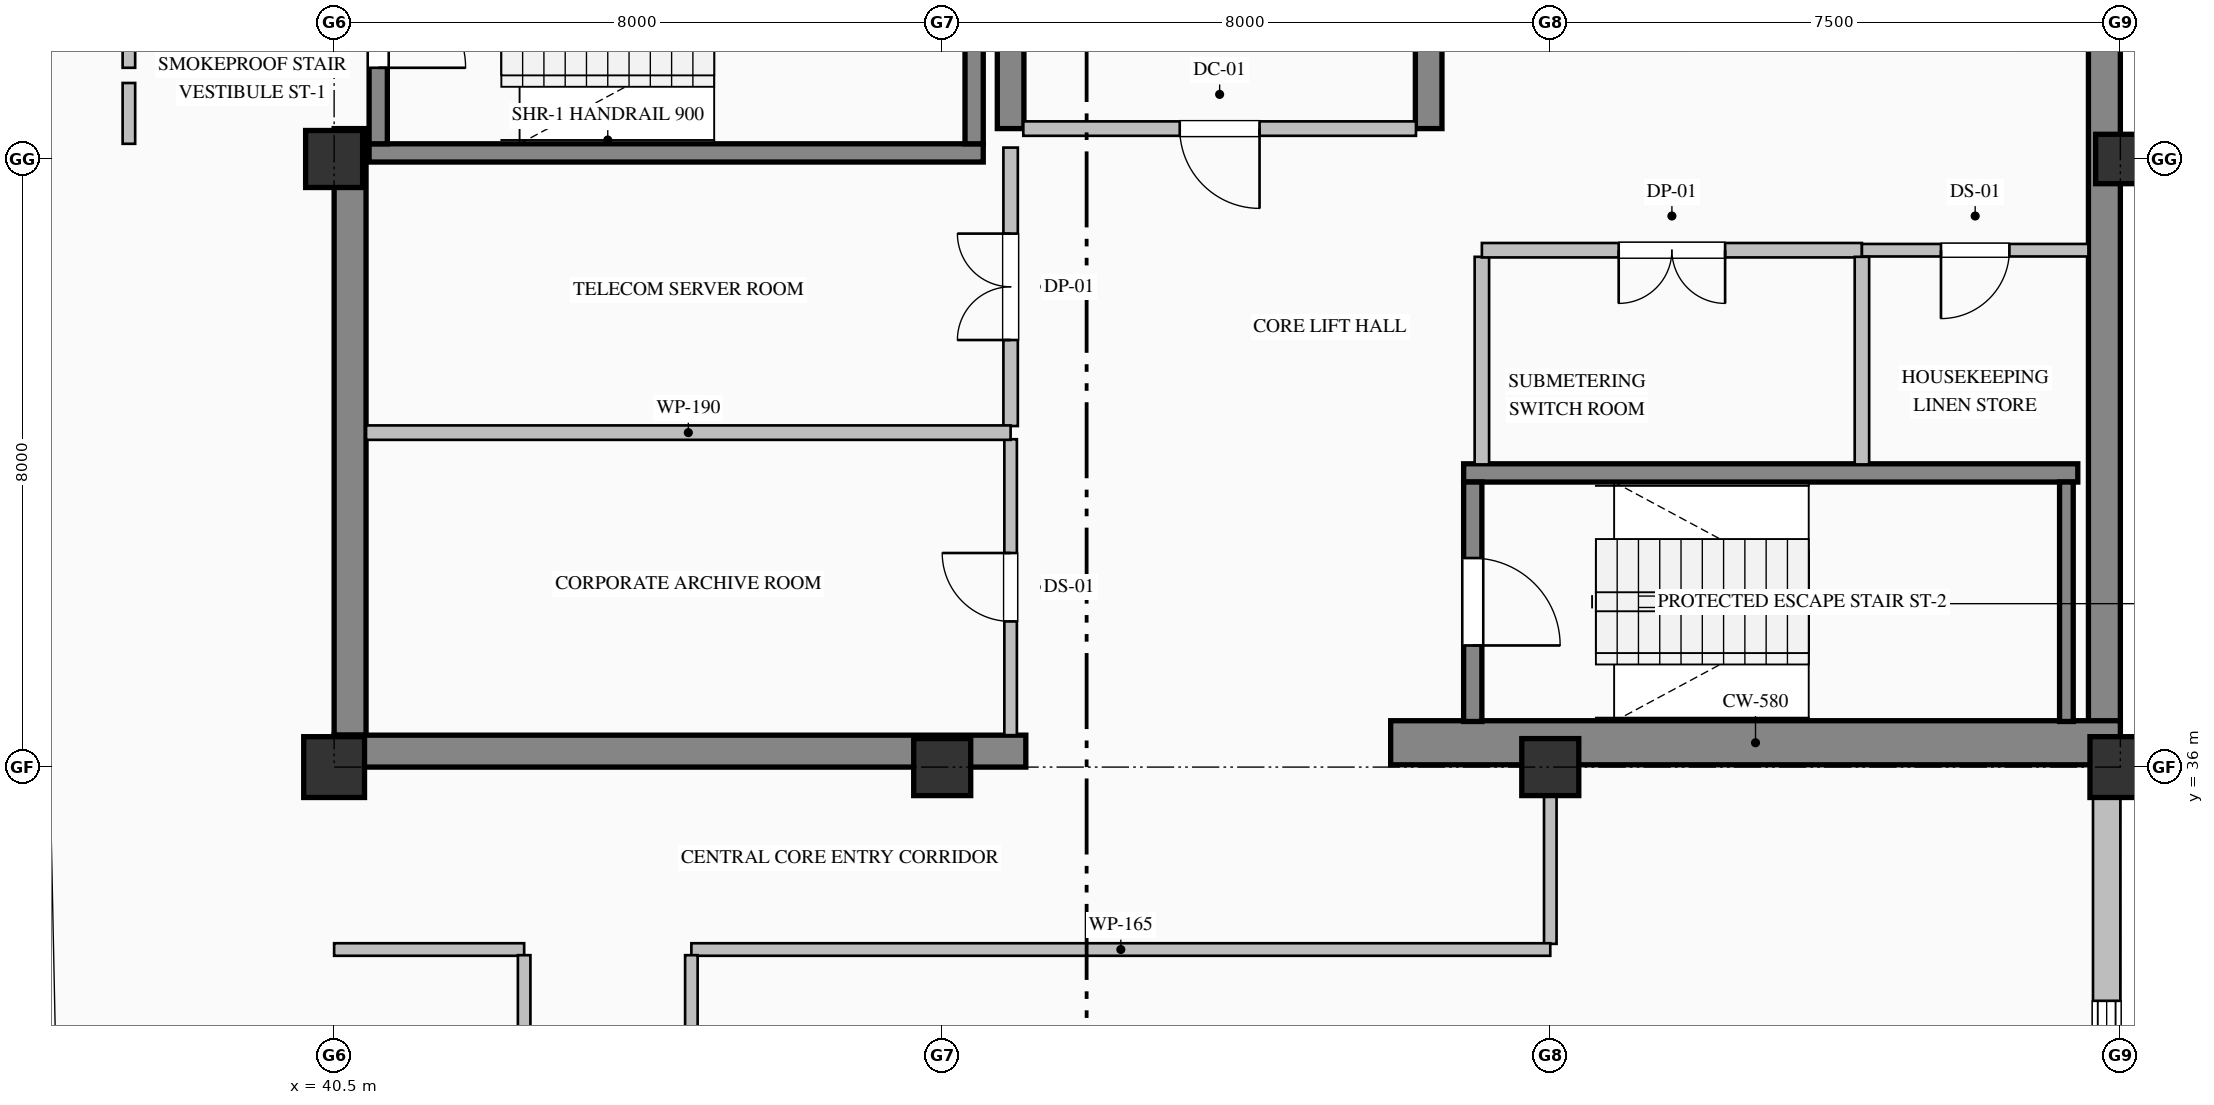
"""IFC4 building model, lengths in metres.
Left out: names, types, materials, properties, quantities, classifications, styles, units other than length and angle.
Written with IfcOpenShell. Run it as: python <this file> out.ifc"""

import sys

from ifc_helpers import new_model, si_unit, direction, frame, frame_2d, origin, origin_2d, place, context, subcontext, project, spatial, rectangle, hollow_rectangle, extrude, element, fill, save


model = new_model("IFC4")
c1 = context("Model", 3, precision=1e-05, world=origin(), true_north=direction((0.0, 1.0)))
c2 = subcontext(c1, "Body", "Model", "MODEL_VIEW")
j1 = project(units=[si_unit("LENGTHUNIT", "METRE"), si_unit("PLANEANGLEUNIT", "RADIAN")], contexts=[c1])
p1 = place(None, origin())
s1 = spatial("IfcSite", under=j1, at=p1, CompositionType="ELEMENT")
p2 = place(p1, origin())
s2 = spatial("IfcBuilding", under=s1, at=p2, CompositionType="ELEMENT")
p3 = place(p2, frame((0.0, 0.0, 311.2)))
s3 = spatial("IfcBuildingStorey", under=s2, at=p3, CompositionType="ELEMENT", Elevation=311.2)
p4 = place(p3, frame((63.79, 36.32, 0.0), z_axis=(0.0, 0.0, 1.0), x_axis=(0.0, 1.0, 0.0)))
e1 = element("IfcWall", 1, at=p4, inside=s3, PredefinedType="SHEAR", context=c2, shape_type="SweptSolid", body=[
    extrude(rectangle(XDim=15.26, YDim=0.42, at=frame_2d((7.63, 0.0))), origin(), (0.0, 0.0, 1.0), 3.785),
])
p5 = place(p3, frame((40.71, 36.42, 0.0), z_axis=(0.0, 0.0, 1.0), x_axis=(0.0, 1.0, 0.0)))
e2 = element("IfcWall", 2, at=p5, inside=s3, PredefinedType="SHEAR", context=c2, shape_type="SweptSolid", body=[
    extrude(rectangle(XDim=7.98, YDim=0.42, at=frame_2d((3.99, 0.0))), origin(), (0.0, 0.0, 1.0), 3.785),
])
p6 = place(p3, frame((40.5, 36.21, 0.0), z_axis=(0.0, 0.0, 1.0), x_axis=(1.0, 0.0, 0.0)))
e3 = element("IfcWall", 3, at=p6, inside=s3, PredefinedType="SHEAR", context=c2, shape_type="SweptSolid", body=[
    extrude(rectangle(XDim=9.1, YDim=0.42, at=frame_2d((4.55, 0.0))), origin(), (0.0, 0.0, 1.0), 3.785),
])
p7 = place(p3, frame((54.4, 36.32, 0.0), z_axis=(0.0, 0.0, 1.0), x_axis=(1.0, 0.0, 0.0)))
e4 = element("IfcWall", 4, at=p7, inside=s3, PredefinedType="SHEAR", context=c2, shape_type="SweptSolid", body=[
    extrude(rectangle(XDim=9.6, YDim=0.58, at=frame_2d((4.8, 0.0))), origin(), (0.0, 0.0, 1.0), 4.0),
])
p8 = place(p3, frame((49.4, 44.4, 0.0), z_axis=(0.0, 0.0, 1.0), x_axis=(0.0, 1.0, 0.0)))
e5 = element("IfcWall", 5, at=p8, inside=s3, PredefinedType="SHEAR", context=c2, shape_type="SweptSolid", body=[
    extrude(rectangle(XDim=3.0, YDim=0.35, at=frame_2d((1.5, 0.0))), origin(), (0.0, 0.0, 1.0), 3.785),
])
p9 = place(p3, frame((54.9, 44.4, 0.0), z_axis=(0.0, 0.0, 1.0), x_axis=(0.0, 1.0, 0.0)))
e6 = element("IfcWall", 6, at=p9, inside=s3, PredefinedType="SHEAR", context=c2, shape_type="SweptSolid", body=[
    extrude(rectangle(XDim=7.18, YDim=0.35, at=frame_2d((3.59, 0.0))), origin(), (0.0, 0.0, 1.0), 3.785),
])
p10 = place(p3, frame((40.5, 36.0, 0.0), z_axis=(0.0, 0.0, 1.0), x_axis=(1.0, 0.0, 0.0)))
e7 = element("IfcColumn", 7, at=p10, inside=s3, PredefinedType="COLUMN", context=c2, shape_type="SweptSolid", body=[
    extrude(hollow_rectangle(XDim=0.8, YDim=0.8, WallThickness=0.032, at=origin_2d()), origin(), (0.0, 0.0, 1.0), 4.0),
])
for number, where, z_axis, x_axis in (
    (8, (40.5, 44.0, 0.0), (0.0, 0.0, 1.0), (1.0, 0.0, 0.0)),
    (9, (48.5, 36.0, 0.0), (0.0, 0.0, 1.0), (1.0, 0.0, 0.0)),
    (10, (56.5, 36.0, 0.0), (0.0, 0.0, 1.0), (1.0, 0.0, 0.0)),
):
    element("IfcColumn", number, at=place(p3, frame(where, z_axis=z_axis, x_axis=x_axis)), inside=s3, PredefinedType="COLUMN", context=c2, shape_type="SweptSolid", body=[
        extrude(rectangle(XDim=0.75, YDim=0.75, at=origin_2d()), origin(), (0.0, 0.0, 1.0), 4.0),
    ])
p11 = place(p3, frame((64.0, 36.0, 0.0), z_axis=(0.0, 0.0, 1.0), x_axis=(1.0, 0.0, 0.0)))
e11 = element("IfcColumn", 11, at=p11, inside=s3, PredefinedType="COLUMN", context=c2, shape_type="SweptSolid", body=[
    extrude(hollow_rectangle(XDim=0.8, YDim=0.8, WallThickness=0.032, at=origin_2d()), origin(), (0.0, 0.0, 1.0), 4.0),
])
p12 = place(p3, frame((64.0, 44.0, 0.0), z_axis=(0.0, 0.0, 1.0), x_axis=(1.0, 0.0, 0.0)))
e12 = element("IfcColumn", 12, at=p12, inside=s3, PredefinedType="COLUMN", context=c2, shape_type="SweptSolid", body=[
    extrude(hollow_rectangle(XDim=0.65, YDim=0.65, WallThickness=0.028, at=origin_2d()), origin(), (0.0, 0.0, 1.0), 4.0),
])
p13 = place(p3, frame((63.82, 36.05, 0.0), z_axis=(0.0, 0.0, 1.0), x_axis=(0.0, -1.0, 0.0)))
e13 = element("IfcWall", 13, at=p13, inside=s3, PredefinedType="SOLIDWALL", context=c2, shape_type="SweptSolid", body=[
    extrude(rectangle(XDim=13.55, YDim=0.36, at=frame_2d((6.775, 0.0))), origin(), (0.0, 0.0, 1.0), 3.335),
])
p14 = place(p13, frame((3.125, 0.0, 0.9)))
e14 = element("IfcOpeningElement", 14, at=p14, cuts=e13, PredefinedType="OPENING", context=c2, shape_type="SweptSolid", body=[
    extrude(rectangle(XDim=0.95, YDim=1.85, at=frame_2d((0.475, 0.925))), frame((0.0, 0.19, 0.0), z_axis=(0.0, -1.0, 0.0), x_axis=(1.0, 0.0, 0.0)), (0.0, 0.0, 1.0), 0.38),
])
p15 = place(p3, frame((49.04, 44.08, 0.0), z_axis=(0.0, 0.0, 1.0), x_axis=(-1.0, 0.0, 0.0)))
e15 = element("IfcWall", 15, at=p15, inside=s3, PredefinedType="SOLIDWALL", context=c2, shape_type="SweptSolid", body=[
    extrude(rectangle(XDim=8.08, YDim=0.24, at=frame_2d((4.04, 0.0))), origin(), (0.0, 0.0, 1.0), 4.0),
])
p16 = place(p3, frame((41.08, 47.35, 0.0), z_axis=(0.0, 0.0, 1.0), x_axis=(0.0, -1.0, 0.0)))
e16 = element("IfcWall", 16, at=p16, inside=s3, PredefinedType="SOLIDWALL", context=c2, shape_type="SweptSolid", body=[
    extrude(rectangle(XDim=3.15, YDim=0.24, at=frame_2d((1.575, 0.0))), origin(), (0.0, 0.0, 1.0), 4.0),
])
p17 = place(p16, frame((1.0, 0.0, 0.0)))
e17 = element("IfcOpeningElement", 17, at=p17, cuts=e16, PredefinedType="OPENING", context=c2, shape_type="SweptSolid", body=[
    extrude(rectangle(XDim=1.15, YDim=2.2, at=frame_2d((0.575, 1.1))), frame((0.0, 0.13, 0.0), z_axis=(0.0, -1.0, 0.0), x_axis=(1.0, 0.0, 0.0)), (0.0, 0.0, 1.0), 0.26),
])
p18 = place(p3, frame((48.92, 44.2, 0.0), z_axis=(0.0, 0.0, 1.0), x_axis=(0.0, 1.0, 0.0)))
e18 = element("IfcWall", 18, at=p18, inside=s3, PredefinedType="SOLIDWALL", context=c2, shape_type="SweptSolid", body=[
    extrude(rectangle(XDim=3.15, YDim=0.24, at=frame_2d((1.575, 0.0))), origin(), (0.0, 0.0, 1.0), 4.0),
])
p19 = place(p3, frame((55.36, 39.87, 0.0), z_axis=(0.0, 0.0, 1.0), x_axis=(1.0, 0.0, 0.0)))
e19 = element("IfcWall", 19, at=p19, inside=s3, PredefinedType="SOLIDWALL", context=c2, shape_type="SweptSolid", body=[
    extrude(rectangle(XDim=8.08, YDim=0.24, at=frame_2d((4.04, 0.0))), origin(), (0.0, 0.0, 1.0), 4.0),
])
p20 = place(p3, frame((55.48, 39.75, 0.0), z_axis=(0.0, 0.0, 1.0), x_axis=(0.0, -1.0, 0.0)))
e20 = element("IfcWall", 20, at=p20, inside=s3, PredefinedType="SOLIDWALL", context=c2, shape_type="SweptSolid", body=[
    extrude(rectangle(XDim=3.15, YDim=0.24, at=frame_2d((1.575, 0.0))), origin(), (0.0, 0.0, 1.0), 4.0),
])
p21 = place(p20, frame((1.0, 0.0, 0.0)))
e21 = element("IfcOpeningElement", 21, at=p21, cuts=e20, PredefinedType="OPENING", context=c2, shape_type="SweptSolid", body=[
    extrude(rectangle(XDim=1.15, YDim=2.2, at=frame_2d((0.575, 1.1))), frame((0.0, 0.13, 0.0), z_axis=(0.0, -1.0, 0.0), x_axis=(1.0, 0.0, 0.0)), (0.0, 0.0, 1.0), 0.26),
])
p22 = place(p3, frame((63.29, 36.6, 0.0), z_axis=(0.0, 0.0, 1.0), x_axis=(0.0, 1.0, 0.0)))
e22 = element("IfcWall", 22, at=p22, inside=s3, PredefinedType="SOLIDWALL", context=c2, shape_type="SweptSolid", body=[
    extrude(rectangle(XDim=3.15, YDim=0.18, at=frame_2d((1.575, 0.0))), origin(), (0.0, 0.0, 1.0), 4.0),
])
p23 = place(p3, frame((37.8, 45.2, 0.0), z_axis=(0.0, 0.0, 1.0), x_axis=(0.0, 1.0, 0.0)))
e23 = element("IfcWall", 23, at=p23, inside=s3, PredefinedType="PARTITIONING", context=c2, shape_type="SweptSolid", body=[
    extrude(rectangle(XDim=2.125, YDim=0.165, at=frame_2d((1.063, 0.0))), origin(), (0.0, 0.0, 1.0), 3.785),
])
p24 = place(p23, frame((0.538, 0.0, 0.0)))
e24 = element("IfcOpeningElement", 24, at=p24, cuts=e23, PredefinedType="OPENING", context=c2, shape_type="SweptSolid", body=[
    extrude(rectangle(XDim=1.05, YDim=2.15, at=frame_2d((0.525, 1.075))), frame((0.0, 0.093, 0.0), z_axis=(0.0, -1.0, 0.0), x_axis=(1.0, 0.0, 0.0)), (0.0, 0.0, 1.0), 0.185),
])
p25 = place(p3, frame((37.8, 44.2, 0.0), z_axis=(0.0, 0.0, 1.0), x_axis=(0.0, 1.0, 0.0)))
e25 = element("IfcWall", 25, at=p25, inside=s3, PredefinedType="PARTITIONING", context=c2, shape_type="SweptSolid", body=[
    extrude(rectangle(XDim=0.8, YDim=0.165, at=frame_2d((0.4, 0.0))), origin(), (0.0, 0.0, 1.0), 3.785),
])
p26 = place(p3, frame((54.733, 44.4, 0.0), z_axis=(0.0, 0.0, 1.0), x_axis=(-1.0, 0.0, 0.0)))
e26 = element("IfcWall", 26, at=p26, inside=s3, PredefinedType="PARTITIONING", context=c2, shape_type="SweptSolid", body=[
    extrude(rectangle(XDim=5.166, YDim=0.19, at=frame_2d((2.583, 0.0))), origin(), (0.0, 0.0, 1.0), 3.785),
])
p27 = place(p26, frame((2.058, 0.0, 0.0)))
e27 = element("IfcOpeningElement", 27, at=p27, cuts=e26, PredefinedType="OPENING", context=c2, shape_type="SweptSolid", body=[
    extrude(rectangle(XDim=1.05, YDim=2.15, at=frame_2d((0.525, 1.075))), frame((0.0, 0.105, 0.0), z_axis=(0.0, -1.0, 0.0), x_axis=(1.0, 0.0, 0.0)), (0.0, 0.0, 1.0), 0.21),
])
p28 = place(p3, frame((49.4, 36.42, 0.0), z_axis=(0.0, 0.0, 1.0), x_axis=(0.0, 1.0, 0.0)))
e28 = element("IfcWall", 28, at=p28, inside=s3, PredefinedType="PARTITIONING", context=c2, shape_type="SweptSolid", body=[
    extrude(rectangle(XDim=3.893, YDim=0.165, at=frame_2d((1.947, 0.0))), origin(), (0.0, 0.0, 1.0), 3.027),
])
p29 = place(p28, frame((1.497, 0.0, 0.0)))
e29 = element("IfcOpeningElement", 29, at=p29, cuts=e28, PredefinedType="OPENING", context=c2, shape_type="SweptSolid", body=[
    extrude(rectangle(XDim=0.9, YDim=2.15, at=frame_2d((0.45, 1.075))), frame((0.0, 0.093, 0.0), z_axis=(0.0, -1.0, 0.0), x_axis=(1.0, 0.0, 0.0)), (0.0, 0.0, 1.0), 0.185),
])
p30 = place(p3, frame((49.4, 40.487, 0.0), z_axis=(0.0, 0.0, 1.0), x_axis=(0.0, 1.0, 0.0)))
e30 = element("IfcWall", 30, at=p30, inside=s3, PredefinedType="PARTITIONING", context=c2, shape_type="SweptSolid", body=[
    extrude(rectangle(XDim=3.663, YDim=0.19, at=frame_2d((1.832, 0.0))), origin(), (0.0, 0.0, 1.0), 3.027),
])
p31 = place(p30, frame((1.132, 0.0, 0.0)))
e31 = element("IfcOpeningElement", 31, at=p31, cuts=e30, PredefinedType="OPENING", context=c2, shape_type="SweptSolid", body=[
    extrude(rectangle(XDim=1.4, YDim=2.25, at=frame_2d((0.7, 1.125))), frame((0.0, 0.105, 0.0), z_axis=(0.0, -1.0, 0.0), x_axis=(1.0, 0.0, 0.0)), (0.0, 0.0, 1.0), 0.21),
])
p32 = place(p3, frame((55.6, 42.713, 0.0), z_axis=(0.0, 0.0, 1.0), x_axis=(0.0, -1.0, 0.0)))
e32 = element("IfcWall", 32, at=p32, inside=s3, PredefinedType="PARTITIONING", context=c2, shape_type="SweptSolid", body=[
    extrude(rectangle(XDim=2.731, YDim=0.19, at=frame_2d((1.365, 0.0))), origin(), (0.0, 0.0, 1.0), 3.785),
])
p33 = place(p3, frame((40.92, 40.4, 0.0), z_axis=(0.0, 0.0, 1.0), x_axis=(1.0, 0.0, 0.0)))
e33 = element("IfcWall", 33, at=p33, inside=s3, PredefinedType="PARTITIONING", context=c2, shape_type="SweptSolid", body=[
    extrude(rectangle(XDim=8.48, YDim=0.19, at=frame_2d((4.24, 0.0))), origin(), (0.0, 0.0, 1.0), 3.785),
])
p34 = place(p3, frame((60.6, 42.8, 0.0), z_axis=(0.0, 0.0, 1.0), x_axis=(-1.0, 0.0, 0.0)))
e34 = element("IfcWall", 34, at=p34, inside=s3, PredefinedType="PARTITIONING", context=c2, shape_type="SweptSolid", body=[
    extrude(rectangle(XDim=5.0, YDim=0.19, at=frame_2d((2.5, 0.0))), origin(), (0.0, 0.0, 1.0), 3.785),
])
p35 = place(p34, frame((1.8, 0.0, 0.0)))
e35 = element("IfcOpeningElement", 35, at=p35, cuts=e34, PredefinedType="OPENING", context=c2, shape_type="SweptSolid", body=[
    extrude(rectangle(XDim=1.4, YDim=2.25, at=frame_2d((0.7, 1.125))), frame((0.0, 0.105, 0.0), z_axis=(0.0, -1.0, 0.0), x_axis=(1.0, 0.0, 0.0)), (0.0, 0.0, 1.0), 0.21),
])
p36 = place(p3, frame((63.58, 42.8, 0.0), z_axis=(0.0, 0.0, 1.0), x_axis=(-1.0, 0.0, 0.0)))
e36 = element("IfcWall", 36, at=p36, inside=s3, PredefinedType="PARTITIONING", context=c2, shape_type="SweptSolid", body=[
    extrude(rectangle(XDim=2.98, YDim=0.165, at=frame_2d((1.49, 0.0))), origin(), (0.0, 0.0, 1.0), 3.785),
])
p37 = place(p36, frame((1.04, 0.0, 0.0)))
e37 = element("IfcOpeningElement", 37, at=p37, cuts=e36, PredefinedType="OPENING", context=c2, shape_type="SweptSolid", body=[
    extrude(rectangle(XDim=0.9, YDim=2.15, at=frame_2d((0.45, 1.075))), frame((0.0, 0.093, 0.0), z_axis=(0.0, -1.0, 0.0), x_axis=(1.0, 0.0, 0.0)), (0.0, 0.0, 1.0), 0.185),
])
p38 = place(p3, frame((60.6, 42.713, 0.0), z_axis=(0.0, 0.0, 1.0), x_axis=(0.0, -1.0, 0.0)))
e38 = element("IfcWall", 38, at=p38, inside=s3, PredefinedType="PARTITIONING", context=c2, shape_type="SweptSolid", body=[
    extrude(rectangle(XDim=2.731, YDim=0.19, at=frame_2d((1.365, 0.0))), origin(), (0.0, 0.0, 1.0), 3.785),
])
p39 = place(p3, frame((56.5, 36.0, 0.0), z_axis=(0.0, 0.0, 1.0), x_axis=(0.0, -1.0, 0.0)))
e39 = element("IfcWall", 39, at=p39, inside=s3, PredefinedType="PARTITIONING", context=c2, shape_type="SweptSolid", body=[
    extrude(rectangle(XDim=2.325, YDim=0.165, at=frame_2d((1.163, 0.0))), origin(), (0.0, 0.0, 1.0), 3.177),
])
p40 = place(p3, frame((56.5, 33.6, 0.0), z_axis=(0.0, 0.0, 1.0), x_axis=(-1.0, 0.0, 0.0)))
e40 = element("IfcWall", 40, at=p40, inside=s3, PredefinedType="PARTITIONING", context=c2, shape_type="SweptSolid", body=[
    extrude(rectangle(XDim=11.3, YDim=0.165, at=frame_2d((5.65, 0.0))), origin(), (0.0, 0.0, 1.0), 3.785),
])
p41 = place(p3, frame((43.0, 33.6, 0.0), z_axis=(0.0, 0.0, 1.0), x_axis=(-1.0, 0.0, 0.0)))
e41 = element("IfcWall", 41, at=p41, inside=s3, PredefinedType="PARTITIONING", context=c2, shape_type="SweptSolid", body=[
    extrude(rectangle(XDim=2.5, YDim=0.165, at=frame_2d((1.25, 0.0))), origin(), (0.0, 0.0, 1.0), 3.785),
])
p42 = place(p3, frame((45.2, 33.525, 0.0), z_axis=(0.0, 0.0, 1.0), x_axis=(0.0, -1.0, 0.0)))
e42 = element("IfcWall", 42, at=p42, inside=s3, PredefinedType="PARTITIONING", context=c2, shape_type="SweptSolid", body=[
    extrude(rectangle(XDim=8.451, YDim=0.165, at=frame_2d((4.226, 0.0))), origin(), (0.0, 0.0, 1.0), 3.785),
])
p43 = place(p3, frame((43.0, 22.875, 0.0), z_axis=(0.0, 0.0, 1.0), x_axis=(0.0, 1.0, 0.0)))
e43 = element("IfcWall", 43, at=p43, inside=s3, PredefinedType="PARTITIONING", context=c2, shape_type="SweptSolid", body=[
    extrude(rectangle(XDim=10.651, YDim=0.165, at=frame_2d((5.325, 0.0))), origin(), (0.0, 0.0, 1.0), 3.785),
])
p44 = place(p43, frame((4.825, 0.0, 0.0)))
e44 = element("IfcOpeningElement", 44, at=p44, cuts=e43, PredefinedType="OPENING", context=c2, shape_type="SweptSolid", body=[
    extrude(rectangle(XDim=1.0, YDim=2.15, at=frame_2d((0.5, 1.075))), frame((0.0, 0.093, 0.0), z_axis=(0.0, -1.0, 0.0), x_axis=(1.0, 0.0, 0.0)), (0.0, 0.0, 1.0), 0.185),
])
p45 = place(p14, origin())
e45 = element("IfcWindow", 45, at=p45, inside=s3, PartitioningType="SINGLE_PANEL", PredefinedType="WINDOW", context=c2, shape_type="SweptSolid", body=[
    extrude(rectangle(XDim=0.95, YDim=1.85, at=frame_2d((0.475, 0.925))), frame((0.0, 0.15, 0.0), z_axis=(0.0, -1.0, 0.0), x_axis=(1.0, 0.0, 0.0)), (0.0, 0.0, 1.0), 0.06),
])
fill(e14, e45)
p46 = place(p17, origin())
e46 = element("IfcDoor", 46, at=p46, inside=s3, OperationType="SINGLE_SWING_RIGHT", PredefinedType="DOOR", context=c2, shape_type="SweptSolid", body=[
    extrude(rectangle(XDim=1.15, YDim=2.2, at=frame_2d((0.575, 1.1))), frame((0.0, 0.025, 0.0), z_axis=(0.0, -1.0, 0.0), x_axis=(1.0, 0.0, 0.0)), (0.0, 0.0, 1.0), 0.05),
])
fill(e17, e46)
p47 = place(p21, origin())
e47 = element("IfcDoor", 47, at=p47, inside=s3, OperationType="SINGLE_SWING_RIGHT", PredefinedType="DOOR", context=c2, shape_type="SweptSolid", body=[
    extrude(rectangle(XDim=1.15, YDim=2.2, at=frame_2d((0.575, 1.1))), frame((0.0, 0.025, 0.0), z_axis=(0.0, -1.0, 0.0), x_axis=(1.0, 0.0, 0.0)), (0.0, 0.0, 1.0), 0.05),
])
fill(e21, e47)
p48 = place(p27, origin())
e48 = element("IfcDoor", 48, at=p48, inside=s3, OperationType="SINGLE_SWING_LEFT", PredefinedType="DOOR", context=c2, shape_type="SweptSolid", body=[
    extrude(rectangle(XDim=1.05, YDim=2.15, at=frame_2d((0.525, 1.075))), frame((0.0, 0.025, 0.0), z_axis=(0.0, -1.0, 0.0), x_axis=(1.0, 0.0, 0.0)), (0.0, 0.0, 1.0), 0.05),
])
fill(e27, e48)
p49 = place(p29, origin())
e49 = element("IfcDoor", 49, at=p49, inside=s3, OperationType="SINGLE_SWING_RIGHT", PredefinedType="DOOR", context=c2, shape_type="SweptSolid", body=[
    extrude(rectangle(XDim=0.9, YDim=2.15, at=frame_2d((0.45, 1.075))), frame((0.0, 0.025, 0.0), z_axis=(0.0, -1.0, 0.0), x_axis=(1.0, 0.0, 0.0)), (0.0, 0.0, 1.0), 0.05),
])
fill(e29, e49)
p50 = place(p31, origin())
e50 = element("IfcDoor", 50, at=p50, inside=s3, OperationType="DOUBLE_DOOR_SINGLE_SWING", PredefinedType="DOOR", context=c2, shape_type="SweptSolid", body=[
    extrude(rectangle(XDim=1.4, YDim=2.25, at=frame_2d((0.7, 1.125))), frame((0.0, 0.025, 0.0), z_axis=(0.0, -1.0, 0.0), x_axis=(1.0, 0.0, 0.0)), (0.0, 0.0, 1.0), 0.05),
])
fill(e31, e50)
p51 = place(p35, origin())
e51 = element("IfcDoor", 51, at=p51, inside=s3, OperationType="DOUBLE_DOOR_SINGLE_SWING", PredefinedType="DOOR", context=c2, shape_type="SweptSolid", body=[
    extrude(rectangle(XDim=1.4, YDim=2.25, at=frame_2d((0.7, 1.125))), frame((0.0, 0.025, 0.0), z_axis=(0.0, -1.0, 0.0), x_axis=(1.0, 0.0, 0.0)), (0.0, 0.0, 1.0), 0.05),
])
fill(e35, e51)
p52 = place(p37, origin())
e52 = element("IfcDoor", 52, at=p52, inside=s3, OperationType="SINGLE_SWING_RIGHT", PredefinedType="DOOR", context=c2, shape_type="SweptSolid", body=[
    extrude(rectangle(XDim=0.9, YDim=2.15, at=frame_2d((0.45, 1.075))), frame((0.0, 0.025, 0.0), z_axis=(0.0, -1.0, 0.0), x_axis=(1.0, 0.0, 0.0)), (0.0, 0.0, 1.0), 0.05),
])
fill(e37, e52)
save(model, sys.argv[1])
